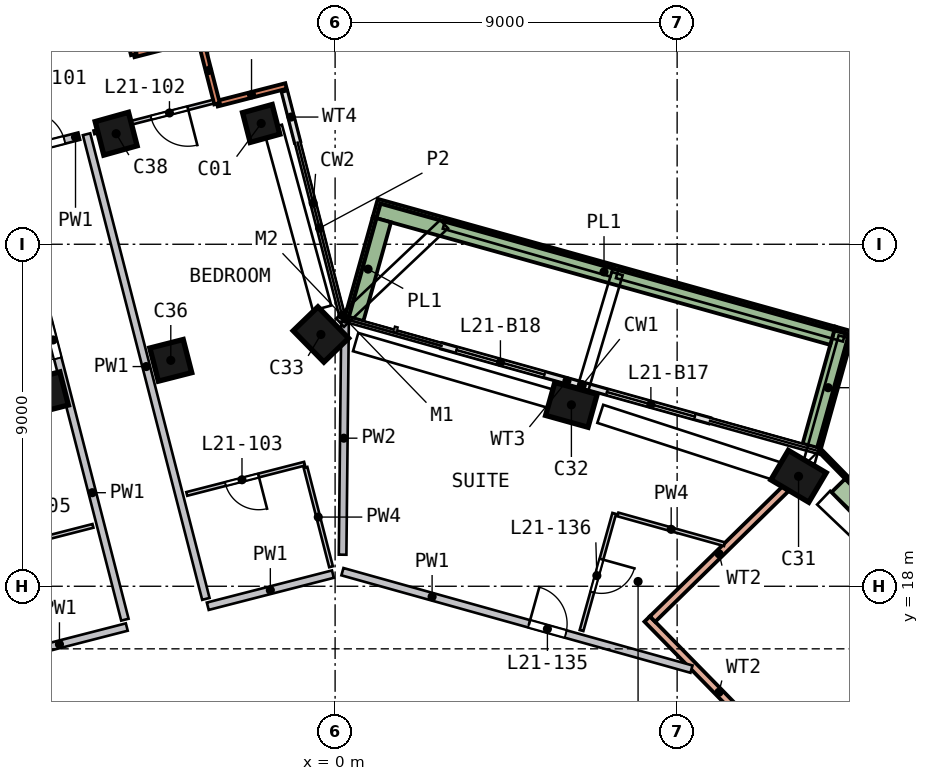
"""IFC4 building model, lengths in metres.
Left out: names, types, materials, properties, quantities, classifications, styles, units other than length and angle.
Written with IfcOpenShell. Run it as: python <this file> out.ifc"""

import sys

from ifc_helpers import new_model, si_unit, direction, frame, frame_2d, origin, origin_2d, place, context, subcontext, project, spatial, rectangle, extrude, element, fill, save


model = new_model("IFC4")
c1 = context("Model", 3, precision=1e-05, world=origin(), true_north=direction((0.0, 1.0)))
c2 = subcontext(c1, "Body", "Model", "MODEL_VIEW")
j1 = project(units=[si_unit("LENGTHUNIT", "METRE"), si_unit("PLANEANGLEUNIT", "RADIAN")], contexts=[c1])
p1 = place(None, origin())
s1 = spatial("IfcSite", under=j1, at=p1, CompositionType="ELEMENT")
p2 = place(p1, origin())
s2 = spatial("IfcBuilding", under=s1, at=p2, CompositionType="ELEMENT")
p3 = place(p2, frame((0.0, 0.0, 93.0)))
s3 = spatial("IfcBuildingStorey", under=s2, at=p3, CompositionType="ELEMENT", Elevation=93.0)
p4 = place(p3, frame((-1.821, 30.374, 0.0), z_axis=(-0.101606646, -0.15954949, 0.981947071), x_axis=(-0.26390046, 0.956015231, 0.128029)))
e1 = element("IfcColumn", 1, at=p4, inside=s3, PredefinedType="COLUMN", context=c2, shape_type="SweptSolid", body=[
    extrude(rectangle(XDim=0.8, YDim=0.8, at=origin_2d()), origin(), (0.0, 0.0, 1.0), 3.249),
])
p5 = place(p3, frame((12.315, 20.824, 0.0), z_axis=(-0.099518574, 0.057704047, 0.993361111), x_axis=(0.855090222, -0.505557069, 0.115033745)))
e2 = element("IfcColumn", 2, at=p5, inside=s3, PredefinedType="COLUMN", context=c2, shape_type="SweptSolid", body=[
    extrude(rectangle(XDim=1.15, YDim=0.9, at=origin_2d()), origin(), (0.0, 0.0, 1.0), 3.211),
])
p6 = place(p3, frame((6.349, 22.739, 0.0), z_axis=(-0.108372319, 0.029279539, 0.993679098), x_axis=(-0.957051078, 0.267305592, -0.112253975)))
e3 = element("IfcColumn", 3, at=p6, inside=s3, PredefinedType="COLUMN", context=c2, shape_type="SweptSolid", body=[
    extrude(rectangle(XDim=1.15, YDim=0.9, at=origin_2d()), origin(), (0.0, 0.0, 1.0), 3.21),
])
p7 = place(p3, frame((-0.232, 24.628, 0.0), z_axis=(-0.117127646, -0.002052204, 0.993114748), x_axis=(0.692287383, -0.717155185, 0.080166207)))
e4 = element("IfcColumn", 4, at=p7, inside=s3, PredefinedType="COLUMN", context=c2, shape_type="SweptSolid", body=[
    extrude(rectangle(XDim=1.15, YDim=0.9, at=origin_2d()), origin(), (0.0, 0.0, 1.0), 3.212),
])
p8 = place(p3, frame((-6.16, 33.038, 0.0), z_axis=(-0.113315066, -0.179135039, 0.977276999), x_axis=(-0.962594287, -0.223856191, -0.152645486)))
e5 = element("IfcColumn", 5, at=p8, inside=s3, PredefinedType="COLUMN", context=c2, shape_type="SweptSolid", body=[
    extrude(rectangle(XDim=0.8, YDim=0.8, at=origin_2d()), origin(), (0.0, 0.0, 1.0), 3.264),
])
for number, where, z_axis, x_axis in (
    (6, (-4.186, 23.97, 0.0), (-0.114, -0.021, 0.993), (-0.248, 0.969, -0.008)),
    (7, (-7.437, 23.135, 0.0), (-0.11, -0.036, 0.993), (-0.249, 0.968, 0.008)),
):
    element("IfcColumn", number, at=place(p3, frame(where, z_axis=z_axis, x_axis=x_axis)), inside=s3, PredefinedType="COLUMN", context=c2, shape_type="SweptSolid", body=[
        extrude(rectangle(XDim=0.9, YDim=0.9, at=origin_2d()), origin(), (0.0, 0.0, 1.0), 3.211),
    ])
p9 = place(p3, frame((-5.639, 30.126, 0.0), z_axis=(-0.09989117, -0.177001458, 0.979128305), x_axis=(-0.2665984, 0.952830564, 0.145048992)))
e8 = element("IfcColumn", 8, at=p9, inside=s3, PredefinedType="COLUMN", context=c2, shape_type="SweptSolid", body=[
    extrude(rectangle(XDim=0.9, YDim=0.9, at=origin_2d()), origin(), (0.0, 0.0, 1.0), 3.258),
])
p10 = place(p3, frame((-1.291, 31.165, 0.0), z_axis=(0.0, 0.0, 1.0), x_axis=(-0.968583492, -0.248688597, 0.0)))
e9 = element("IfcWall", 9, at=p10, inside=s3, PredefinedType="SOLIDWALL", context=c2, shape_type="SweptSolid", body=[
    extrude(rectangle(XDim=1.875, YDim=0.15, at=frame_2d((0.938, 0.0))), origin(), (0.0, 0.0, 1.0), 3.19),
])
p11 = place(p3, frame((-3.107, 30.699, 0.0), z_axis=(0.0, 0.0, 1.0), x_axis=(-0.248593961, 0.968607786, 0.0)))
e10 = element("IfcWall", 10, at=p11, inside=s3, PredefinedType="SOLIDWALL", context=c2, shape_type="SweptSolid", body=[
    extrude(rectangle(XDim=1.8, YDim=0.15, at=frame_2d((0.9, 0.0))), origin(), (0.0, 0.0, 1.0), 3.19),
])
for number, where, z_axis, x_axis in (
    (11, (-3.482, 32.461, 0.0), (0.0, 0.0, 1.0), (-0.969, -0.249, 0.0)),
    (12, (-5.298, 31.995, 0.0), (0.0, 0.0, 1.0), (-0.249, 0.969, 0.0)),
):
    element("IfcWall", number, at=place(p3, frame(where, z_axis=z_axis, x_axis=x_axis)), inside=s3, PredefinedType="SOLIDWALL", context=c2, shape_type="SweptSolid", body=[
        extrude(rectangle(XDim=1.875, YDim=0.15, at=frame_2d((0.938, 0.0))), origin(), (0.0, 0.0, 1.0), 3.19),
    ])
p12 = place(p3, frame((-0.99, 29.689, 0.0), z_axis=(0.0, 0.0, 1.0), x_axis=(-0.248612873, 0.968602932, 0.0)))
e13 = element("IfcWall", 13, at=p12, inside=s3, PredefinedType="SOLIDWALL", context=c2, shape_type="SweptSolid", body=[
    extrude(rectangle(XDim=1.36, YDim=0.15, at=frame_2d((0.68, 0.0))), origin(), (0.0, 0.0, 1.0), 2.425),
])
p13 = place(p3, frame((9.85, 22.358, 0.0), z_axis=(0.0, 0.0, 1.0), x_axis=(-0.96315568, 0.268944485, 0.0)))
e14 = element("IfcWall", 14, at=p13, inside=s3, PredefinedType="SOLIDWALL", context=c2, shape_type="SweptSolid", body=[
    extrude(rectangle(XDim=3.475, YDim=0.15, at=frame_2d((1.737, 0.0))), origin(), (0.0, 0.0, 1.0), 2.425),
])
p14 = place(p13, frame((0.4, 0.0, 0.0)))
e15 = element("IfcOpeningElement", 15, at=p14, cuts=e14, PredefinedType="OPENING", context=c2, shape_type="SweptSolid", body=[
    extrude(rectangle(XDim=2.4, YDim=2.4, at=frame_2d((1.2, 1.2))), frame((0.0, 0.085, 0.0), z_axis=(0.0, -1.0, 0.0), x_axis=(1.0, 0.0, 0.0)), (0.0, 0.0, 1.0), 0.17),
])
p15 = place(p3, frame((6.503, 23.292, 0.0), z_axis=(0.0, 0.0, 1.0), x_axis=(-0.963161418, 0.268923935, 0.0)))
e16 = element("IfcWall", 16, at=p15, inside=s3, PredefinedType="SOLIDWALL", context=c2, shape_type="SweptSolid", body=[
    extrude(rectangle(XDim=3.836, YDim=0.15, at=frame_2d((1.918, 0.0))), origin(), (0.0, 0.0, 1.0), 2.425),
])
p16 = place(p15, frame((1.035, 0.0, 0.0)))
e17 = element("IfcOpeningElement", 17, at=p16, cuts=e16, PredefinedType="OPENING", context=c2, shape_type="SweptSolid", body=[
    extrude(rectangle(XDim=2.4, YDim=2.4, at=frame_2d((1.2, 1.2))), frame((0.0, 0.085, 0.0), z_axis=(0.0, -1.0, 0.0), x_axis=(1.0, 0.0, 0.0)), (0.0, 0.0, 1.0), 0.17),
])
p17 = place(p3, frame((12.544, 21.685, 0.0), z_axis=(0.0, 0.0, 1.0), x_axis=(0.26885989, 0.963179298, 0.0)))
e18 = element("IfcWall", 18, at=p17, inside=s3, PredefinedType="SOLIDWALL", context=c2, shape_type="SweptSolid", body=[
    extrude(rectangle(XDim=3.199, YDim=0.5, at=frame_2d((1.6, 0.0))), origin(), (0.0, 0.0, 1.0), 0.7),
])
p18 = place(p3, frame((13.096, 24.593, 0.0), z_axis=(0.0, 0.0, 1.0), x_axis=(-0.963161131, 0.268924963, 0.0)))
e19 = element("IfcWall", 19, at=p18, inside=s3, PredefinedType="SOLIDWALL", context=c2, shape_type="SweptSolid", body=[
    extrude(rectangle(XDim=12.5, YDim=0.5, at=frame_2d((6.25, 0.0))), origin(), (0.0, 0.0, 1.0), 0.7),
])
p19 = place(p3, frame((1.23, 27.646, 0.0), z_axis=(0.0, 0.0, 1.0), x_axis=(-0.268921917, -0.963161982, 0.0)))
e20 = element("IfcWall", 20, at=p19, inside=s3, PredefinedType="SOLIDWALL", context=c2, shape_type="SweptSolid", body=[
    extrude(rectangle(XDim=2.699, YDim=0.5, at=frame_2d((1.35, 0.0))), origin(), (0.0, 0.0, 1.0), 0.7),
])
p20 = place(p3, frame((8.211, 17.139, 0.0), z_axis=(0.0, 0.0, 1.0), x_axis=(0.699668735, -0.714467397, 0.0)))
e21 = element("IfcWall", 21, at=p20, inside=s3, PredefinedType="SOLIDWALL", context=c2, shape_type="SweptSolid", body=[
    extrude(rectangle(XDim=13.0, YDim=0.2, at=frame_2d((6.5, 0.0))), origin(), (0.0, 0.0, 1.0), 3.19),
])
p21 = place(p20, frame((5.6, 0.0, 0.0)))
e22 = element("IfcOpeningElement", 22, at=p21, cuts=e21, PredefinedType="OPENING", context=c2, shape_type="SweptSolid", body=[
    extrude(rectangle(XDim=1.8, YDim=2.4, at=frame_2d((0.9, 1.2))), frame((0.0, 0.11, 0.0), z_axis=(0.0, -1.0, 0.0), x_axis=(1.0, 0.0, 0.0)), (0.0, 0.0, 1.0), 0.22),
])
p22 = place(p3, frame((11.856, 20.568, 0.0), z_axis=(0.0, 0.0, 1.0), x_axis=(-0.714486057, -0.69964968, 0.0)))
e23 = element("IfcWall", 23, at=p22, inside=s3, PredefinedType="SOLIDWALL", context=c2, shape_type="SweptSolid", body=[
    extrude(rectangle(XDim=4.904, YDim=0.2, at=frame_2d((2.452, 0.0))), origin(), (0.0, 0.0, 1.0), 3.19),
])
p23 = place(p3, frame((21.788, 12.351, 0.0), z_axis=(0.0, 0.0, 1.0), x_axis=(-0.699662003, 0.71447399, 0.0)))
e24 = element("IfcWall", 24, at=p23, inside=s3, PredefinedType="SOLIDWALL", context=c2, shape_type="SweptSolid", body=[
    extrude(rectangle(XDim=12.84, YDim=0.1, at=frame_2d((6.42, 0.0))), origin(), (0.0, 0.0, 1.0), 0.7),
])
p24 = place(p3, frame((16.357, 17.468, 0.0), z_axis=(0.0, 0.0, 1.0), x_axis=(-0.699668514, 0.714467613, 0.0)))
e25 = element("IfcWall", 25, at=p24, inside=s3, PredefinedType="SOLIDWALL", context=c2, shape_type="SweptSolid", body=[
    extrude(rectangle(XDim=4.454, YDim=0.5, at=frame_2d((2.227, 0.0))), origin(), (0.0, 0.0, 1.0), 0.7),
])
p25 = place(p3, frame((-8.479, 29.397, 0.0), z_axis=(0.0, 0.0, 1.0), x_axis=(0.96860289, 0.248613037, 0.0)))
e26 = element("IfcWall", 26, at=p25, inside=s3, PredefinedType="SOLIDWALL", context=c2, shape_type="SweptSolid", body=[
    extrude(rectangle(XDim=1.804, YDim=0.2, at=frame_2d((0.902, 0.0))), origin(), (0.0, 0.0, 1.0), 3.19),
])
p26 = place(p25, frame((0.4, 0.0, 0.0)))
e27 = element("IfcOpeningElement", 27, at=p26, cuts=e26, PredefinedType="OPENING", context=c2, shape_type="SweptSolid", body=[
    extrude(rectangle(XDim=1.0, YDim=2.1, at=frame_2d((0.5, 1.05))), frame((0.0, 0.11, 0.0), z_axis=(0.0, -1.0, 0.0), x_axis=(1.0, 0.0, 0.0)), (0.0, 0.0, 1.0), 0.22),
])
p27 = place(p3, frame((-5.482, 16.927, 0.0), z_axis=(0.0, 0.0, 1.0), x_axis=(-0.968576117, -0.24871732, 0.0)))
e28 = element("IfcWall", 28, at=p27, inside=s3, PredefinedType="SOLIDWALL", context=c2, shape_type="SweptSolid", body=[
    extrude(rectangle(XDim=3.658, YDim=0.2, at=frame_2d((1.829, 0.0))), origin(), (0.0, 0.0, 1.0), 3.19),
])
p28 = place(p3, frame((-5.531, 17.121, 0.0), z_axis=(0.0, 0.0, 1.0), x_axis=(-0.24868755, 0.968583761, 0.0)))
e29 = element("IfcWall", 29, at=p28, inside=s3, PredefinedType="SOLIDWALL", context=c2, shape_type="SweptSolid", body=[
    extrude(rectangle(XDim=12.624, YDim=0.2, at=frame_2d((6.312, 0.0))), origin(), (0.0, 0.0, 1.0), 3.19),
])
p29 = place(p28, frame((7.1, 0.0, 0.0)))
e30 = element("IfcOpeningElement", 30, at=p29, cuts=e29, PredefinedType="OPENING", context=c2, shape_type="SweptSolid", body=[
    extrude(rectangle(XDim=1.0, YDim=2.1, at=frame_2d((0.5, 1.05))), frame((0.0, 0.11, 0.0), z_axis=(0.0, -1.0, 0.0), x_axis=(1.0, 0.0, 0.0)), (0.0, 0.0, 1.0), 0.22),
])
p30 = place(p3, frame((-3.401, 17.668, 0.0), z_axis=(0.0, 0.0, 1.0), x_axis=(-0.24868755, 0.968583761, 0.0)))
e31 = element("IfcWall", 31, at=p30, inside=s3, PredefinedType="SOLIDWALL", context=c2, shape_type="SweptSolid", body=[
    extrude(rectangle(XDim=12.624, YDim=0.2, at=frame_2d((6.312, 0.0))), origin(), (0.0, 0.0, 1.0), 3.19),
])
p31 = place(p3, frame((-0.058, 18.32, 0.0), z_axis=(0.0, 0.0, 1.0), x_axis=(-0.968589847, -0.248663847, 0.0)))
e32 = element("IfcWall", 32, at=p31, inside=s3, PredefinedType="SOLIDWALL", context=c2, shape_type="SweptSolid", body=[
    extrude(rectangle(XDim=3.4, YDim=0.2, at=frame_2d((1.7, 0.0))), origin(), (0.0, 0.0, 1.0), 3.19),
])
p32 = place(p3, frame((0.193, 18.384, 0.0), z_axis=(0.0, 0.0, 1.0), x_axis=(0.963159453, -0.268930974, 0.0)))
e33 = element("IfcWall", 33, at=p32, inside=s3, PredefinedType="SOLIDWALL", context=c2, shape_type="SweptSolid", body=[
    extrude(rectangle(XDim=9.537, YDim=0.2, at=frame_2d((4.768, 0.0))), origin(), (0.0, 0.0, 1.0), 3.19),
])
p33 = place(p32, frame((5.1, 0.0, 0.0)))
e34 = element("IfcOpeningElement", 34, at=p33, cuts=e33, PredefinedType="OPENING", context=c2, shape_type="SweptSolid", body=[
    extrude(rectangle(XDim=1.0, YDim=2.1, at=frame_2d((0.5, 1.05))), frame((0.0, 0.11, 0.0), z_axis=(0.0, -1.0, 0.0), x_axis=(1.0, 0.0, 0.0)), (0.0, 0.0, 1.0), 0.22),
])
p34 = place(p3, frame((0.261, 24.963, 0.0), z_axis=(0.0, 0.0, 1.0), x_axis=(-0.010471255, -0.999945175, 0.0)))
e35 = element("IfcWall", 35, at=p34, inside=s3, PredefinedType="SOLIDWALL", context=c2, shape_type="SweptSolid", body=[
    extrude(rectangle(XDim=6.132, YDim=0.2, at=frame_2d((3.066, 0.0))), origin(), (0.0, 0.0, 1.0), 3.19),
])
p35 = place(p3, frame((-6.372, 19.589, 0.0), z_axis=(0.0, 0.0, 1.0), x_axis=(-0.968583069, -0.248690247, 0.0)))
e36 = element("IfcWall", 36, at=p35, inside=s3, PredefinedType="PARTITIONING", context=c2, shape_type="SweptSolid", body=[
    extrude(rectangle(XDim=3.6, YDim=0.1, at=frame_2d((1.8, 0.0))), origin(), (0.0, 0.0, 1.0), 3.19),
])
p36 = place(p35, frame((1.2, 0.0, 0.0)))
e37 = element("IfcOpeningElement", 37, at=p36, cuts=e36, PredefinedType="OPENING", context=c2, shape_type="SweptSolid", body=[
    extrude(rectangle(XDim=1.0, YDim=2.1, at=frame_2d((0.5, 1.05))), frame((0.0, 0.06, 0.0), z_axis=(0.0, -1.0, 0.0), x_axis=(1.0, 0.0, 0.0)), (0.0, 0.0, 1.0), 0.12),
])
p37 = place(p3, frame((-3.197, 30.754, 0.0), z_axis=(0.0, 0.0, 1.0), x_axis=(-0.968577204, -0.248713089, 0.0)))
e38 = element("IfcWall", 38, at=p37, inside=s3, PredefinedType="PARTITIONING", context=c2, shape_type="SweptSolid", body=[
    extrude(rectangle(XDim=3.252, YDim=0.1, at=frame_2d((1.626, 0.0))), origin(), (0.0, 0.0, 1.0), 3.19),
])
p38 = place(p37, frame((0.7, 0.0, 0.0)))
e39 = element("IfcOpeningElement", 39, at=p38, cuts=e38, PredefinedType="OPENING", context=c2, shape_type="SweptSolid", body=[
    extrude(rectangle(XDim=1.0, YDim=2.1, at=frame_2d((0.5, 1.05))), frame((0.0, 0.06, 0.0), z_axis=(0.0, -1.0, 0.0), x_axis=(1.0, 0.0, 0.0)), (0.0, 0.0, 1.0), 0.12),
])
p39 = place(p3, frame((-0.804, 21.225, 0.0), z_axis=(0.0, 0.0, 1.0), x_axis=(-0.968579095, -0.248705722, 0.0)))
e40 = element("IfcWall", 40, at=p39, inside=s3, PredefinedType="PARTITIONING", context=c2, shape_type="SweptSolid", body=[
    extrude(rectangle(XDim=3.2, YDim=0.1, at=frame_2d((1.6, 0.0))), origin(), (0.0, 0.0, 1.0), 3.19),
])
p40 = place(p39, frame((1.25, 0.0, 0.0)))
e41 = element("IfcOpeningElement", 41, at=p40, cuts=e40, PredefinedType="OPENING", context=c2, shape_type="SweptSolid", body=[
    extrude(rectangle(XDim=0.9, YDim=2.1, at=frame_2d((0.45, 1.05))), frame((0.0, 0.06, 0.0), z_axis=(0.0, -1.0, 0.0), x_axis=(1.0, 0.0, 0.0)), (0.0, 0.0, 1.0), 0.12),
])
p41 = place(p3, frame((-0.107, 18.513, 0.0), z_axis=(0.0, 0.0, 1.0), x_axis=(-0.24865815, 0.968591309, 0.0)))
e42 = element("IfcWall", 42, at=p41, inside=s3, PredefinedType="PARTITIONING", context=c2, shape_type="SweptSolid", body=[
    extrude(rectangle(XDim=2.7, YDim=0.1, at=frame_2d((1.35, 0.0))), origin(), (0.0, 0.0, 1.0), 3.19),
])
p42 = place(p3, frame((7.345, 19.917, 0.0), z_axis=(0.0, 0.0, 1.0), x_axis=(-0.268942177, -0.963156324, 0.0)))
e43 = element("IfcWall", 43, at=p42, inside=s3, PredefinedType="PARTITIONING", context=c2, shape_type="SweptSolid", body=[
    extrude(rectangle(XDim=3.2, YDim=0.1, at=frame_2d((1.6, 0.0))), origin(), (0.0, 0.0, 1.0), 3.19),
])
p43 = place(p42, frame((1.25, 0.0, 0.0)))
e44 = element("IfcOpeningElement", 44, at=p43, cuts=e43, PredefinedType="OPENING", context=c2, shape_type="SweptSolid", body=[
    extrude(rectangle(XDim=0.9, YDim=2.1, at=frame_2d((0.45, 1.05))), frame((0.0, 0.06, 0.0), z_axis=(0.0, -1.0, 0.0), x_axis=(1.0, 0.0, 0.0)), (0.0, 0.0, 1.0), 0.12),
])
p44 = place(p3, frame((7.441, 19.89, 0.0), z_axis=(0.0, 0.0, 1.0), x_axis=(0.963173581, -0.268880369, 0.0)))
e45 = element("IfcWall", 45, at=p44, inside=s3, PredefinedType="PARTITIONING", context=c2, shape_type="SweptSolid", body=[
    extrude(rectangle(XDim=2.912, YDim=0.1, at=frame_2d((1.456, 0.0))), origin(), (0.0, 0.0, 1.0), 3.19),
])
p45 = place(p14, origin())
e46 = element("IfcDoor", 46, at=p45, inside=s3, OperationType="SLIDING_TO_RIGHT", PredefinedType="DOOR", context=c2, shape_type="SweptSolid", body=[
    extrude(rectangle(XDim=2.4, YDim=2.4, at=frame_2d((1.2, 1.2))), frame((0.0, 0.025, 0.0), z_axis=(0.0, -1.0, 0.0), x_axis=(1.0, 0.0, 0.0)), (0.0, 0.0, 1.0), 0.05),
])
fill(e15, e46)
p46 = place(p16, origin())
e47 = element("IfcDoor", 47, at=p46, inside=s3, OperationType="SLIDING_TO_LEFT", PredefinedType="DOOR", context=c2, shape_type="SweptSolid", body=[
    extrude(rectangle(XDim=2.4, YDim=2.4, at=frame_2d((1.2, 1.2))), frame((0.0, 0.025, 0.0), z_axis=(0.0, -1.0, 0.0), x_axis=(1.0, 0.0, 0.0)), (0.0, 0.0, 1.0), 0.05),
])
fill(e17, e47)
p47 = place(p26, origin())
e48 = element("IfcDoor", 48, at=p47, inside=s3, OperationType="SINGLE_SWING_LEFT", PredefinedType="DOOR", context=c2, shape_type="SweptSolid", body=[
    extrude(rectangle(XDim=1.0, YDim=2.1, at=frame_2d((0.5, 1.05))), frame((0.0, 0.025, 0.0), z_axis=(0.0, -1.0, 0.0), x_axis=(1.0, 0.0, 0.0)), (0.0, 0.0, 1.0), 0.05),
])
fill(e27, e48)
p48 = place(p38, origin())
e49 = element("IfcDoor", 49, at=p48, inside=s3, OperationType="SINGLE_SWING_LEFT", PredefinedType="DOOR", context=c2, shape_type="SweptSolid", body=[
    extrude(rectangle(XDim=1.0, YDim=2.1, at=frame_2d((0.5, 1.05))), frame((0.0, 0.025, 0.0), z_axis=(0.0, -1.0, 0.0), x_axis=(1.0, 0.0, 0.0)), (0.0, 0.0, 1.0), 0.05),
])
fill(e39, e49)
p49 = place(p40, origin())
e50 = element("IfcDoor", 50, at=p49, inside=s3, OperationType="SINGLE_SWING_LEFT", PredefinedType="DOOR", context=c2, shape_type="SweptSolid", body=[
    extrude(rectangle(XDim=0.9, YDim=2.1, at=frame_2d((0.45, 1.05))), frame((0.0, 0.025, 0.0), z_axis=(0.0, -1.0, 0.0), x_axis=(1.0, 0.0, 0.0)), (0.0, 0.0, 1.0), 0.05),
])
fill(e41, e50)
p50 = place(p29, origin())
e51 = element("IfcDoor", 51, at=p50, inside=s3, OperationType="SINGLE_SWING_RIGHT", PredefinedType="DOOR", context=c2, shape_type="SweptSolid", body=[
    extrude(rectangle(XDim=1.0, YDim=2.1, at=frame_2d((0.5, 1.05))), frame((0.0, 0.025, 0.0), z_axis=(0.0, -1.0, 0.0), x_axis=(1.0, 0.0, 0.0)), (0.0, 0.0, 1.0), 0.05),
])
fill(e30, e51)
p51 = place(p33, origin())
e52 = element("IfcDoor", 52, at=p51, inside=s3, OperationType="SINGLE_SWING_LEFT", PredefinedType="DOOR", context=c2, shape_type="SweptSolid", body=[
    extrude(rectangle(XDim=1.0, YDim=2.1, at=frame_2d((0.5, 1.05))), frame((0.0, 0.025, 0.0), z_axis=(0.0, -1.0, 0.0), x_axis=(1.0, 0.0, 0.0)), (0.0, 0.0, 1.0), 0.05),
])
fill(e34, e52)
p52 = place(p43, origin())
e53 = element("IfcDoor", 53, at=p52, inside=s3, OperationType="SINGLE_SWING_LEFT", PredefinedType="DOOR", context=c2, shape_type="SweptSolid", body=[
    extrude(rectangle(XDim=0.9, YDim=2.1, at=frame_2d((0.45, 1.05))), frame((0.0, 0.025, 0.0), z_axis=(0.0, -1.0, 0.0), x_axis=(1.0, 0.0, 0.0)), (0.0, 0.0, 1.0), 0.05),
])
fill(e44, e53)
save(model, sys.argv[1])
